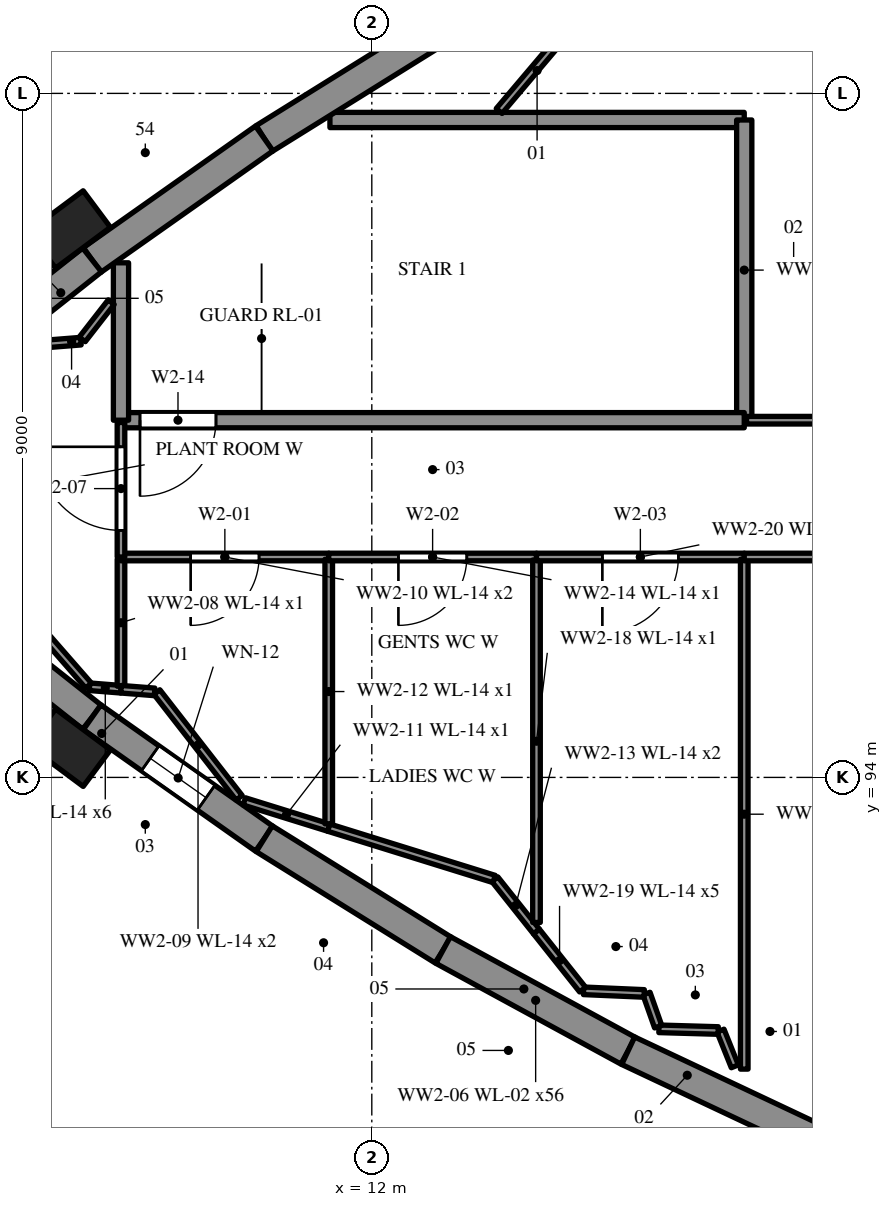
"""IFC4 building model, lengths in metres.
Left out: names, types, materials, properties, quantities, classifications, styles, units other than length and angle.
Written with IfcOpenShell. Run it as: python <this file> out.ifc"""

import sys

from ifc_helpers import new_model, si_unit, direction, frame, frame_2d, origin, origin_2d, place, context, subcontext, project, spatial, polyline, rectangle, outline, extrude, element, fill, save


model = new_model("IFC4")
c1 = context("Model", 3, precision=1e-05, world=origin(), true_north=direction((0.0, 1.0)))
c2 = subcontext(c1, "Body", "Model", "MODEL_VIEW")
j1 = project(units=[si_unit("LENGTHUNIT", "METRE"), si_unit("PLANEANGLEUNIT", "RADIAN")], contexts=[c1])
p1 = place(None, origin())
s1 = spatial("IfcSite", under=j1, at=p1, CompositionType="ELEMENT")
p2 = place(p1, origin())
s2 = spatial("IfcBuilding", under=s1, at=p2, CompositionType="ELEMENT")
p3 = place(p2, frame((0.0, 0.0, 10.2)))
s3 = spatial("IfcBuildingStorey", under=s2, at=p3, CompositionType="ELEMENT", Elevation=10.2)
p4 = place(p3, frame((11.449, 102.65, 0.0), z_axis=(0.0, 0.0, 1.0), x_axis=(1.0, 0.0, 0.0)))
e1 = element("IfcWall", 1, at=p4, inside=s3, PredefinedType="SHEAR", context=c2, shape_type="SweptSolid", body=[
    extrude(outline(polyline([(0.0, 0.0), (5.451, 0.0), (5.451, 5.932), (4.821, 5.484), (4.753, 5.432), (2.565, 3.752), (2.483, 3.69), (2.402, 3.62), (0.637, 2.939), (0.561, 2.959), (0.484, 2.948), (0.0, 2.872), (0.0, 0.0)])), frame((0.0, 0.1, 0.0), z_axis=(0.0, -1.0, 0.0), x_axis=(1.0, 0.0, 0.0)), (0.0, 0.0, 1.0), 0.2),
])
p5 = place(p3, frame((16.9, 102.65, 0.0), z_axis=(0.0, 0.0, 1.0), x_axis=(0.0, -1.0, 0.0)))
e2 = element("IfcWall", 2, at=p5, inside=s3, PredefinedType="SHEAR", context=c2, shape_type="SweptSolid", body=[
    extrude(outline(polyline([(0.0, 0.0), (3.95, 0.0), (3.95, 8.974), (3.769, 8.785), (3.646, 8.657), (3.523, 8.537), (2.253, 7.61), (1.958, 7.394), (1.664, 7.182), (0.0, 5.936), (0.0, 0.0)])), frame((0.0, 0.1, 0.0), z_axis=(0.0, -1.0, 0.0), x_axis=(1.0, 0.0, 0.0)), (0.0, 0.0, 1.0), 0.2),
])
p6 = place(p3, frame((16.9, 98.7, 0.0), z_axis=(0.0, 0.0, 1.0), x_axis=(-1.0, 0.0, 0.0)))
e3 = element("IfcWall", 3, at=p6, inside=s3, PredefinedType="SHEAR", context=c2, shape_type="SweptSolid", body=[
    extrude(outline(polyline([(0.0, 0.0), (8.2, 0.0), (8.2, 5.845), (8.187, 5.849), (8.088, 5.881), (7.972, 5.899), (7.896, 5.911), (7.819, 5.891), (0.0, 8.908), (0.0, 0.0)])), frame((0.0, 0.1, 0.0), z_axis=(0.0, -1.0, 0.0), x_axis=(1.0, 0.0, 0.0)), (0.0, 0.0, 1.0), 0.2),
])
p7 = place(p6, frame((6.95, 0.0, 0.0)))
e4 = element("IfcOpeningElement", 4, at=p7, cuts=e3, PredefinedType="OPENING", context=c2, shape_type="SweptSolid", body=[
    extrude(rectangle(XDim=1.0, YDim=2.4, at=frame_2d((0.5, 1.2))), frame((0.0, 0.11, 0.0), z_axis=(0.0, -1.0, 0.0), x_axis=(1.0, 0.0, 0.0)), (0.0, 0.0, 1.0), 0.22),
])
p8 = place(p3, frame((8.7, 98.7, 0.0), z_axis=(0.0, 0.0, 1.0), x_axis=(0.0, 1.0, 0.0)))
e5 = element("IfcWall", 5, at=p8, inside=s3, PredefinedType="SHEAR", context=c2, shape_type="SweptSolid", body=[
    extrude(outline(polyline([(0.0, 0.0), (2.071, 0.0), (2.071, 4.028), (0.077, 5.842), (0.0, 5.912), (0.0, 0.0)])), frame((0.0, 0.1, 0.0), z_axis=(0.0, -1.0, 0.0), x_axis=(1.0, 0.0, 0.0)), (0.0, 0.0, 1.0), 0.2),
])
p9 = place(p3, frame((6.387, 96.32, 0.0), z_axis=(0.0, 0.0, 1.0), x_axis=(0.784278812541, -0.620408530082, 0.0)))
e6 = element("IfcWall", 6, at=p9, inside=s3, PredefinedType="SOLIDWALL", context=c2, shape_type="SweptSolid", body=[
    extrude(outline(polyline([(0.0, 0.0), (2.464, 0.0), (2.464, 3.551), (2.446, 3.544), (2.288, 3.486), (2.129, 3.428), (0.051, 2.669), (0.0, 2.651), (0.0, 0.0)])), frame((0.0, 0.2, 0.0), z_axis=(0.0, -1.0, 0.0), x_axis=(1.0, 0.0, 0.0)), (0.0, 0.0, 1.0), 0.4),
])
p10 = place(p3, frame((8.32, 94.792, 0.0), z_axis=(0.0, 0.0, 1.0), x_axis=(0.817028877428, -0.576596751161, 0.0)))
e7 = element("IfcWall", 7, at=p10, inside=s3, PredefinedType="SOLIDWALL", context=c2, shape_type="SweptSolid", body=[
    extrude(outline(polyline([(0.0, 0.0), (2.772, 0.0), (2.772, 2.848), (2.406, 2.968), (0.311, 3.647), (0.169, 3.693), (0.0, 3.555), (0.0, 0.0)])), frame((0.0, 0.2, 0.0), z_axis=(0.0, -1.0, 0.0), x_axis=(1.0, 0.0, 0.0)), (0.0, 0.0, 1.0), 0.4),
])
p11 = place(p10, frame((0.936, 0.0, 1.6)))
e8 = element("IfcOpeningElement", 8, at=p11, cuts=e7, PredefinedType="OPENING", context=c2, shape_type="SweptSolid", body=[
    extrude(rectangle(XDim=0.9, YDim=0.6, at=frame_2d((0.45, 0.3))), frame((0.0, 0.21, 0.0), z_axis=(0.0, -1.0, 0.0), x_axis=(1.0, 0.0, 0.0)), (0.0, 0.0, 1.0), 0.42),
])
p12 = place(p3, frame((10.585, 93.193, 0.0), z_axis=(0.0, 0.0, 1.0), x_axis=(0.84912946359, -0.528184772653, 0.0)))
e9 = element("IfcWall", 9, at=p12, inside=s3, PredefinedType="SOLIDWALL", context=c2, shape_type="SweptSolid", body=[
    extrude(outline(polyline([(0.0, 0.0), (2.772, 0.0), (2.772, 1.97), (2.247, 2.14), (0.321, 2.757), (0.0, 2.845), (0.0, 0.0)])), frame((0.0, 0.2, 0.0), z_axis=(0.0, -1.0, 0.0), x_axis=(1.0, 0.0, 0.0)), (0.0, 0.0, 1.0), 0.4),
])
p13 = place(p3, frame((12.938, 91.729, 0.0), z_axis=(0.0, 0.0, 1.0), x_axis=(0.878292493566, -0.478123724308, 0.0)))
e10 = element("IfcWall", 10, at=p13, inside=s3, PredefinedType="SOLIDWALL", context=c2, shape_type="SweptSolid", body=[
    extrude(outline(polyline([(0.0, 0.0), (2.772, 0.0), (2.772, 2.807), (2.737, 2.796), (0.057, 1.926), (0.0, 1.966), (0.0, 0.0)])), frame((0.0, 0.2, 0.0), z_axis=(0.0, -1.0, 0.0), x_axis=(1.0, 0.0, 0.0)), (0.0, 0.0, 1.0), 0.4),
])
p14 = place(p3, frame((15.373, 90.404, 0.0), z_axis=(0.0, 0.0, 1.0), x_axis=(0.904527098751, -0.42641614372, 0.0)))
e11 = element("IfcWall", 11, at=p14, inside=s3, PredefinedType="SOLIDWALL", context=c2, shape_type="SweptSolid", body=[
    extrude(outline(polyline([(0.0, 0.0), (2.772, 0.0), (2.772, 3.716), (2.751, 3.709), (2.657, 3.679), (2.563, 3.648), (0.0, 2.811), (0.0, 0.0)])), frame((0.0, 0.2, 0.0), z_axis=(0.0, -1.0, 0.0), x_axis=(1.0, 0.0, 0.0)), (0.0, 0.0, 1.0), 0.4),
])
p15 = place(p3, frame((12.938, 103.871, 0.0), z_axis=(0.0, 0.0, 1.0), x_axis=(-0.84912946359, -0.528184772653, 0.0)))
e12 = element("IfcWall", 12, at=p15, inside=s3, PredefinedType="SOLIDWALL", context=c2, shape_type="SweptSolid", body=[
    extrude(outline(polyline([(0.0, 0.0), (2.772, 0.0), (2.772, 2.845), (2.451, 2.766), (0.525, 2.14), (0.0, 1.97), (0.0, 0.0)])), frame((0.0, 0.2, 0.0), z_axis=(0.0, -1.0, 0.0), x_axis=(1.0, 0.0, 0.0)), (0.0, 0.0, 1.0), 0.4),
])
p16 = place(p3, frame((10.585, 102.407, 0.0), z_axis=(0.0, 0.0, 1.0), x_axis=(-0.817070367038, -0.57653795652, 0.0)))
e13 = element("IfcWall", 13, at=p16, inside=s3, PredefinedType="SOLIDWALL", context=c2, shape_type="SweptSolid", body=[
    extrude(outline(polyline([(0.0, 0.0), (2.772, 0.0), (2.772, 3.555), (2.744, 3.568), (2.603, 3.693), (2.462, 3.647), (0.367, 2.968), (0.0, 2.848), (0.0, 0.0)])), frame((0.0, 0.2, 0.0), z_axis=(0.0, -1.0, 0.0), x_axis=(1.0, 0.0, 0.0)), (0.0, 0.0, 1.0), 0.4),
])
p17 = place(p3, frame((8.32, 100.809, 0.0), z_axis=(0.0, 0.0, 1.0), x_axis=(-0.784278812541, -0.620408530082, 0.0)))
e14 = element("IfcWall", 14, at=p17, inside=s3, PredefinedType="SOLIDWALL", context=c2, shape_type="SweptSolid", body=[
    extrude(outline(polyline([(0.0, 0.0), (2.464, 0.0), (2.464, 2.651), (2.414, 2.669), (0.335, 3.428), (0.177, 3.486), (0.0, 3.551), (0.0, 0.0)])), frame((0.0, 0.2, 0.0), z_axis=(0.0, -1.0, 0.0), x_axis=(1.0, 0.0, 0.0)), (0.0, 0.0, 1.0), 0.4),
])
for number, where, z_axis, x_axis in (
    (15, (8.021, 94.391, 0.0), (0.0, 0.0, 1.0), (0.802, -0.597, 0.0)),
    (16, (8.021, 101.209, 0.0), (0.0, 0.0, 1.0), (-0.802, -0.597, 0.0)),
):
    element("IfcColumn", number, at=place(p3, frame(where, z_axis=z_axis, x_axis=x_axis)), inside=s3, PredefinedType="PILASTER", context=c2, shape_type="SweptSolid", body=[
        extrude(rectangle(XDim=0.9, YDim=0.6, at=origin_2d()), origin(), (0.0, 0.0, 1.0), 2.507),
    ])
p18 = place(p3, frame((8.7, 95.16, 0.0), z_axis=(0.0, 0.0, 1.0), x_axis=(-0.996882323864, 0.078902676549, 0.0)))
e17 = element("IfcWall", 17, at=p18, inside=s3, PredefinedType="PARTITIONING", context=c2, shape_type="SweptSolid", body=[
    extrude(rectangle(XDim=0.415, YDim=0.1, at=frame_2d((0.207, 0.0))), origin(), (0.0, 0.0, 1.0), 2.5),
])
p19 = place(p3, frame((8.274, 95.208, 0.0), z_axis=(0.0, 0.0, 1.0), x_axis=(-0.658002077141, 0.753016113027, 0.0)))
e18 = element("IfcWall", 18, at=p19, inside=s3, PredefinedType="PARTITIONING", context=c2, shape_type="SweptSolid", body=[
    extrude(rectangle(XDim=3.268, YDim=0.1, at=frame_2d((1.634, 0.0))), origin(), (0.0, 0.0, 1.0), 2.5),
])
p20 = place(p3, frame((7.308, 99.671, 0.0), z_axis=(0.0, 0.0, 1.0), x_axis=(0.996862570919, 0.07915184584, 0.0)))
e19 = element("IfcWall", 19, at=p20, inside=s3, PredefinedType="PARTITIONING", context=c2, shape_type="SweptSolid", body=[
    extrude(rectangle(XDim=0.867, YDim=0.1, at=frame_2d((0.433, 0.0))), origin(), (0.0, 0.0, 1.0), 2.5),
])
p21 = place(p3, frame((8.191, 99.764, 0.0), z_axis=(0.0, 0.0, 1.0), x_axis=(0.61432197666, 0.789055453686, 0.0)))
e20 = element("IfcWall", 20, at=p21, inside=s3, PredefinedType="PARTITIONING", context=c2, shape_type="SweptSolid", body=[
    extrude(rectangle(XDim=0.62, YDim=0.1, at=frame_2d((0.31, 0.0))), origin(), (0.0, 0.0, 1.0), 2.5),
])
p22 = place(p3, frame((8.7, 95.2, 0.0), z_axis=(0.0, 0.0, 1.0), x_axis=(0.0, 1.0, 0.0)))
e21 = element("IfcWall", 21, at=p22, inside=s3, PredefinedType="PARTITIONING", context=c2, shape_type="SweptSolid", body=[
    extrude(rectangle(XDim=1.67, YDim=0.1, at=frame_2d((0.835, 0.0))), origin(), (0.0, 0.0, 1.0), 2.5),
])
p23 = place(p3, frame((10.255, 93.732, 0.0), z_axis=(0.0, 0.0, 1.0), x_axis=(-0.614371992728, 0.78901651095, 0.0)))
e22 = element("IfcWall", 22, at=p23, inside=s3, PredefinedType="PARTITIONING", context=c2, shape_type="SweptSolid", body=[
    extrude(rectangle(XDim=1.763, YDim=0.1, at=frame_2d((0.881, 0.0))), origin(), (0.0, 0.0, 1.0), 2.5),
])
p24 = place(p3, frame((9.142, 95.125, 0.0), z_axis=(0.0, 0.0, 1.0), x_axis=(-0.996900420086, 0.078673708649, 0.0)))
e23 = element("IfcWall", 23, at=p24, inside=s3, PredefinedType="PARTITIONING", context=c2, shape_type="SweptSolid", body=[
    extrude(rectangle(XDim=0.444, YDim=0.1, at=frame_2d((0.222, 0.0))), origin(), (0.0, 0.0, 1.0), 2.5),
])
p25 = place(p3, frame((11.433, 96.9, 0.0), z_axis=(0.0, 0.0, 1.0), x_axis=(-1.0, 0.0, 0.0)))
e24 = element("IfcWall", 24, at=p25, inside=s3, PredefinedType="PARTITIONING", context=c2, shape_type="SweptSolid", body=[
    extrude(rectangle(XDim=2.733, YDim=0.1, at=frame_2d((1.367, 0.0))), origin(), (0.0, 0.0, 1.0), 2.5),
])
p26 = place(p25, frame((0.917, 0.0, 0.0)))
e25 = element("IfcOpeningElement", 25, at=p26, cuts=e24, PredefinedType="OPENING", context=c2, shape_type="SweptSolid", body=[
    extrude(rectangle(XDim=0.9, YDim=2.1, at=frame_2d((0.45, 1.05))), frame((0.0, 0.06, 0.0), z_axis=(0.0, -1.0, 0.0), x_axis=(1.0, 0.0, 0.0)), (0.0, 0.0, 1.0), 0.12),
])
p27 = place(p3, frame((8.7, 96.9, 0.0), z_axis=(0.0, 0.0, 1.0), x_axis=(0.0, 1.0, 0.0)))
e26 = element("IfcWall", 26, at=p27, inside=s3, PredefinedType="PARTITIONING", context=c2, shape_type="SweptSolid", body=[
    extrude(rectangle(XDim=1.77, YDim=0.1, at=frame_2d((0.885, 0.0))), origin(), (0.0, 0.0, 1.0), 2.5),
])
p28 = place(p27, frame((0.35, 0.0, 0.0)))
e27 = element("IfcOpeningElement", 27, at=p28, cuts=e26, PredefinedType="OPENING", context=c2, shape_type="SweptSolid", body=[
    extrude(rectangle(XDim=1.1, YDim=2.1, at=frame_2d((0.55, 1.05))), frame((0.0, 0.06, 0.0), z_axis=(0.0, -1.0, 0.0), x_axis=(1.0, 0.0, 0.0)), (0.0, 0.0, 1.0), 0.12),
])
p29 = place(p3, frame((11.433, 93.339, 0.0), z_axis=(0.0, 0.0, 1.0), x_axis=(-0.954967816351, 0.296709402839, 0.0)))
e28 = element("IfcWall", 28, at=p29, inside=s3, PredefinedType="PARTITIONING", context=c2, shape_type="SweptSolid", body=[
    extrude(rectangle(XDim=1.164, YDim=0.1, at=frame_2d((0.582, 0.0))), origin(), (0.0, 0.0, 1.0), 2.5),
])
p30 = place(p3, frame((11.433, 96.87, 0.0), z_axis=(0.0, 0.0, 1.0), x_axis=(0.0, -1.0, 0.0)))
e29 = element("IfcWall", 29, at=p30, inside=s3, PredefinedType="PARTITIONING", context=c2, shape_type="SweptSolid", body=[
    extrude(rectangle(XDim=3.481, YDim=0.1, at=frame_2d((1.74, 0.0))), origin(), (0.0, 0.0, 1.0), 2.5),
])
p31 = place(p3, frame((14.167, 91.971, 0.0), z_axis=(0.0, 0.0, 1.0), x_axis=(-0.622427080418, 0.782677794218, 0.0)))
e30 = element("IfcWall", 30, at=p31, inside=s3, PredefinedType="PARTITIONING", context=c2, shape_type="SweptSolid", body=[
    extrude(rectangle(XDim=0.881, YDim=0.1, at=frame_2d((0.44, 0.0))), origin(), (0.0, 0.0, 1.0), 2.5),
])
p32 = place(p3, frame((13.609, 92.664, 0.0), z_axis=(0.0, 0.0, 1.0), x_axis=(-0.954997167401, 0.296614919139, 0.0)))
e31 = element("IfcWall", 31, at=p32, inside=s3, PredefinedType="PARTITIONING", context=c2, shape_type="SweptSolid", body=[
    extrude(rectangle(XDim=2.278, YDim=0.1, at=frame_2d((1.139, 0.0))), origin(), (0.0, 0.0, 1.0), 2.5),
])
p33 = place(p3, frame((14.167, 96.9, 0.0), z_axis=(0.0, 0.0, 1.0), x_axis=(-1.0, 0.0, 0.0)))
e32 = element("IfcWall", 32, at=p33, inside=s3, PredefinedType="PARTITIONING", context=c2, shape_type="SweptSolid", body=[
    extrude(rectangle(XDim=2.733, YDim=0.1, at=frame_2d((1.367, 0.0))), origin(), (0.0, 0.0, 1.0), 2.5),
])
p34 = place(p33, frame((0.917, 0.0, 0.0)))
e33 = element("IfcOpeningElement", 33, at=p34, cuts=e32, PredefinedType="OPENING", context=c2, shape_type="SweptSolid", body=[
    extrude(rectangle(XDim=0.9, YDim=2.1, at=frame_2d((0.45, 1.05))), frame((0.0, 0.06, 0.0), z_axis=(0.0, -1.0, 0.0), x_axis=(1.0, 0.0, 0.0)), (0.0, 0.0, 1.0), 0.12),
])
p35 = place(p3, frame((13.675, 102.768, 0.0), z_axis=(0.0, 0.0, 1.0), x_axis=(0.646433781993, 0.76297009476, 0.0)))
e34 = element("IfcWall", 34, at=p35, inside=s3, PredefinedType="PARTITIONING", context=c2, shape_type="SweptSolid", body=[
    extrude(rectangle(XDim=2.493, YDim=0.1, at=frame_2d((1.247, 0.0))), origin(), (0.0, 0.0, 1.0), 2.5),
])
p36 = place(p3, frame((14.167, 96.86, 0.0), z_axis=(0.0, 0.0, 1.0), x_axis=(0.0, -1.0, 0.0)))
e35 = element("IfcWall", 35, at=p36, inside=s3, PredefinedType="PARTITIONING", context=c2, shape_type="SweptSolid", body=[
    extrude(rectangle(XDim=4.769, YDim=0.1, at=frame_2d((2.384, 0.0))), origin(), (0.0, 0.0, 1.0), 2.5),
])
p37 = place(p3, frame((16.776, 90.198, 0.0), z_axis=(0.0, 0.0, 1.0), x_axis=(-0.372303942527, 0.928110863194, 0.0)))
e36 = element("IfcWall", 36, at=p37, inside=s3, PredefinedType="PARTITIONING", context=c2, shape_type="SweptSolid", body=[
    extrude(rectangle(XDim=0.507, YDim=0.1, at=frame_2d((0.253, 0.0))), origin(), (0.0, 0.0, 1.0), 2.5),
])
p38 = place(p3, frame((16.558, 90.67, 0.0), z_axis=(0.0, 0.0, 1.0), x_axis=(-0.999585681844, 0.028783061887, 0.0)))
e37 = element("IfcWall", 37, at=p38, inside=s3, PredefinedType="PARTITIONING", context=c2, shape_type="SweptSolid", body=[
    extrude(rectangle(XDim=0.78, YDim=0.1, at=frame_2d((0.39, 0.0))), origin(), (0.0, 0.0, 1.0), 2.5),
])
p39 = place(p3, frame((15.768, 90.72, 0.0), z_axis=(0.0, 0.0, 1.0), x_axis=(-0.333289761889, 0.942824445281, 0.0)))
e38 = element("IfcWall", 38, at=p39, inside=s3, PredefinedType="PARTITIONING", context=c2, shape_type="SweptSolid", body=[
    extrude(rectangle(XDim=0.462, YDim=0.1, at=frame_2d((0.231, 0.0))), origin(), (0.0, 0.0, 1.0), 2.5),
])
p40 = place(p3, frame((15.584, 91.158, 0.0), z_axis=(0.0, 0.0, 1.0), x_axis=(-0.999069955429, 0.043118721676, 0.0)))
e39 = element("IfcWall", 39, at=p40, inside=s3, PredefinedType="PARTITIONING", context=c2, shape_type="SweptSolid", body=[
    extrude(rectangle(XDim=0.798, YDim=0.1, at=frame_2d((0.399, 0.0))), origin(), (0.0, 0.0, 1.0), 2.5),
])
p41 = place(p3, frame((14.774, 91.208, 0.0), z_axis=(0.0, 0.0, 1.0), x_axis=(-0.62218906709, 0.782867016033, 0.0)))
e40 = element("IfcWall", 40, at=p41, inside=s3, PredefinedType="PARTITIONING", context=c2, shape_type="SweptSolid", body=[
    extrude(rectangle(XDim=0.976, YDim=0.1, at=frame_2d((0.488, 0.0))), origin(), (0.0, 0.0, 1.0), 2.5),
])
p42 = place(p3, frame((16.9, 96.9, 0.0), z_axis=(0.0, 0.0, 1.0), x_axis=(-1.0, 0.0, 0.0)))
e41 = element("IfcWall", 41, at=p42, inside=s3, PredefinedType="PARTITIONING", context=c2, shape_type="SweptSolid", body=[
    extrude(rectangle(XDim=2.733, YDim=0.1, at=frame_2d((1.367, 0.0))), origin(), (0.0, 0.0, 1.0), 2.5),
])
p43 = place(p42, frame((0.867, 0.0, 0.0)))
e42 = element("IfcOpeningElement", 42, at=p43, cuts=e41, PredefinedType="OPENING", context=c2, shape_type="SweptSolid", body=[
    extrude(rectangle(XDim=1.0, YDim=2.1, at=frame_2d((0.5, 1.05))), frame((0.0, 0.06, 0.0), z_axis=(0.0, -1.0, 0.0), x_axis=(1.0, 0.0, 0.0)), (0.0, 0.0, 1.0), 0.12),
])
p44 = place(p3, frame((16.9, 96.87, 0.0), z_axis=(0.0, 0.0, 1.0), x_axis=(0.0, -1.0, 0.0)))
e43 = element("IfcWall", 43, at=p44, inside=s3, PredefinedType="PARTITIONING", context=c2, shape_type="SweptSolid", body=[
    extrude(rectangle(XDim=6.708, YDim=0.1, at=frame_2d((3.354, 0.0))), origin(), (0.0, 0.0, 1.0), 2.5),
])
p45 = place(p3, frame((36.0, 96.9, 0.0), z_axis=(0.0, 0.0, 1.0), x_axis=(-1.0, 0.0, 0.0)))
e44 = element("IfcWall", 44, at=p45, inside=s3, PredefinedType="PARTITIONING", context=c2, shape_type="SweptSolid", body=[
    extrude(rectangle(XDim=19.1, YDim=0.1, at=frame_2d((9.55, 0.0))), origin(), (0.0, 0.0, 1.0), 2.5),
])
p46 = place(p3, frame((16.93, 98.7, 0.0), z_axis=(0.0, 0.0, 1.0), x_axis=(1.0, 0.0, 0.0)))
e45 = element("IfcWall", 45, at=p46, inside=s3, PredefinedType="PARTITIONING", context=c2, shape_type="SweptSolid", body=[
    extrude(rectangle(XDim=28.07, YDim=0.1, at=frame_2d((14.035, 0.0))), origin(), (0.0, 0.0, 1.0), 2.5),
])
p47 = place(p46, frame((20.145, 0.0, 0.0)))
e46 = element("IfcOpeningElement", 46, at=p47, cuts=e45, PredefinedType="OPENING", context=c2, shape_type="SweptSolid", body=[
    extrude(rectangle(XDim=1.8, YDim=2.1, at=frame_2d((0.9, 1.05))), frame((0.0, 0.06, 0.0), z_axis=(0.0, -1.0, 0.0), x_axis=(1.0, 0.0, 0.0)), (0.0, 0.0, 1.0), 0.12),
])
p48 = place(p46, frame((6.095, 0.0, 0.0)))
e47 = element("IfcOpeningElement", 47, at=p48, cuts=e45, PredefinedType="OPENING", context=c2, shape_type="SweptSolid", body=[
    extrude(rectangle(XDim=1.8, YDim=2.1, at=frame_2d((0.9, 1.05))), frame((0.0, 0.06, 0.0), z_axis=(0.0, -1.0, 0.0), x_axis=(1.0, 0.0, 0.0)), (0.0, 0.0, 1.0), 0.12),
])
p49 = place(p11, origin())
e48 = element("IfcWindow", 48, at=p49, inside=s3, PartitioningType="SINGLE_PANEL", PredefinedType="WINDOW", context=c2, shape_type="SweptSolid", body=[
    extrude(rectangle(XDim=0.9, YDim=0.6, at=frame_2d((0.45, 0.3))), frame((0.0, 0.03, 0.0), z_axis=(0.0, -1.0, 0.0), x_axis=(1.0, 0.0, 0.0)), (0.0, 0.0, 1.0), 0.06),
])
fill(e8, e48)
p50 = place(p26, origin())
e49 = element("IfcDoor", 49, at=p50, inside=s3, OperationType="SINGLE_SWING_RIGHT", PredefinedType="DOOR", context=c2, shape_type="SweptSolid", body=[
    extrude(rectangle(XDim=0.9, YDim=2.1, at=frame_2d((0.45, 1.05))), frame((0.0, 0.025, 0.0), z_axis=(0.0, -1.0, 0.0), x_axis=(1.0, 0.0, 0.0)), (0.0, 0.0, 1.0), 0.05),
])
fill(e25, e49)
p51 = place(p34, origin())
e50 = element("IfcDoor", 50, at=p51, inside=s3, OperationType="SINGLE_SWING_RIGHT", PredefinedType="DOOR", context=c2, shape_type="SweptSolid", body=[
    extrude(rectangle(XDim=0.9, YDim=2.1, at=frame_2d((0.45, 1.05))), frame((0.0, 0.025, 0.0), z_axis=(0.0, -1.0, 0.0), x_axis=(1.0, 0.0, 0.0)), (0.0, 0.0, 1.0), 0.05),
])
fill(e33, e50)
p52 = place(p43, origin())
e51 = element("IfcDoor", 51, at=p52, inside=s3, OperationType="SINGLE_SWING_RIGHT", PredefinedType="DOOR", context=c2, shape_type="SweptSolid", body=[
    extrude(rectangle(XDim=1.0, YDim=2.1, at=frame_2d((0.5, 1.05))), frame((0.0, 0.025, 0.0), z_axis=(0.0, -1.0, 0.0), x_axis=(1.0, 0.0, 0.0)), (0.0, 0.0, 1.0), 0.05),
])
fill(e42, e51)
p53 = place(p28, origin())
e52 = element("IfcDoor", 52, at=p53, inside=s3, OperationType="SINGLE_SWING_RIGHT", PredefinedType="DOOR", context=c2, shape_type="SweptSolid", body=[
    extrude(rectangle(XDim=1.1, YDim=2.1, at=frame_2d((0.55, 1.05))), frame((0.0, 0.025, 0.0), z_axis=(0.0, -1.0, 0.0), x_axis=(1.0, 0.0, 0.0)), (0.0, 0.0, 1.0), 0.05),
])
fill(e27, e52)
p54 = place(p7, origin())
e53 = element("IfcDoor", 53, at=p54, inside=s3, OperationType="SINGLE_SWING_RIGHT", PredefinedType="DOOR", context=c2, shape_type="SweptSolid", body=[
    extrude(rectangle(XDim=1.0, YDim=2.4, at=frame_2d((0.5, 1.2))), frame((0.0, 0.025, 0.0), z_axis=(0.0, -1.0, 0.0), x_axis=(1.0, 0.0, 0.0)), (0.0, 0.0, 1.0), 0.05),
])
fill(e4, e53)
save(model, sys.argv[1])
